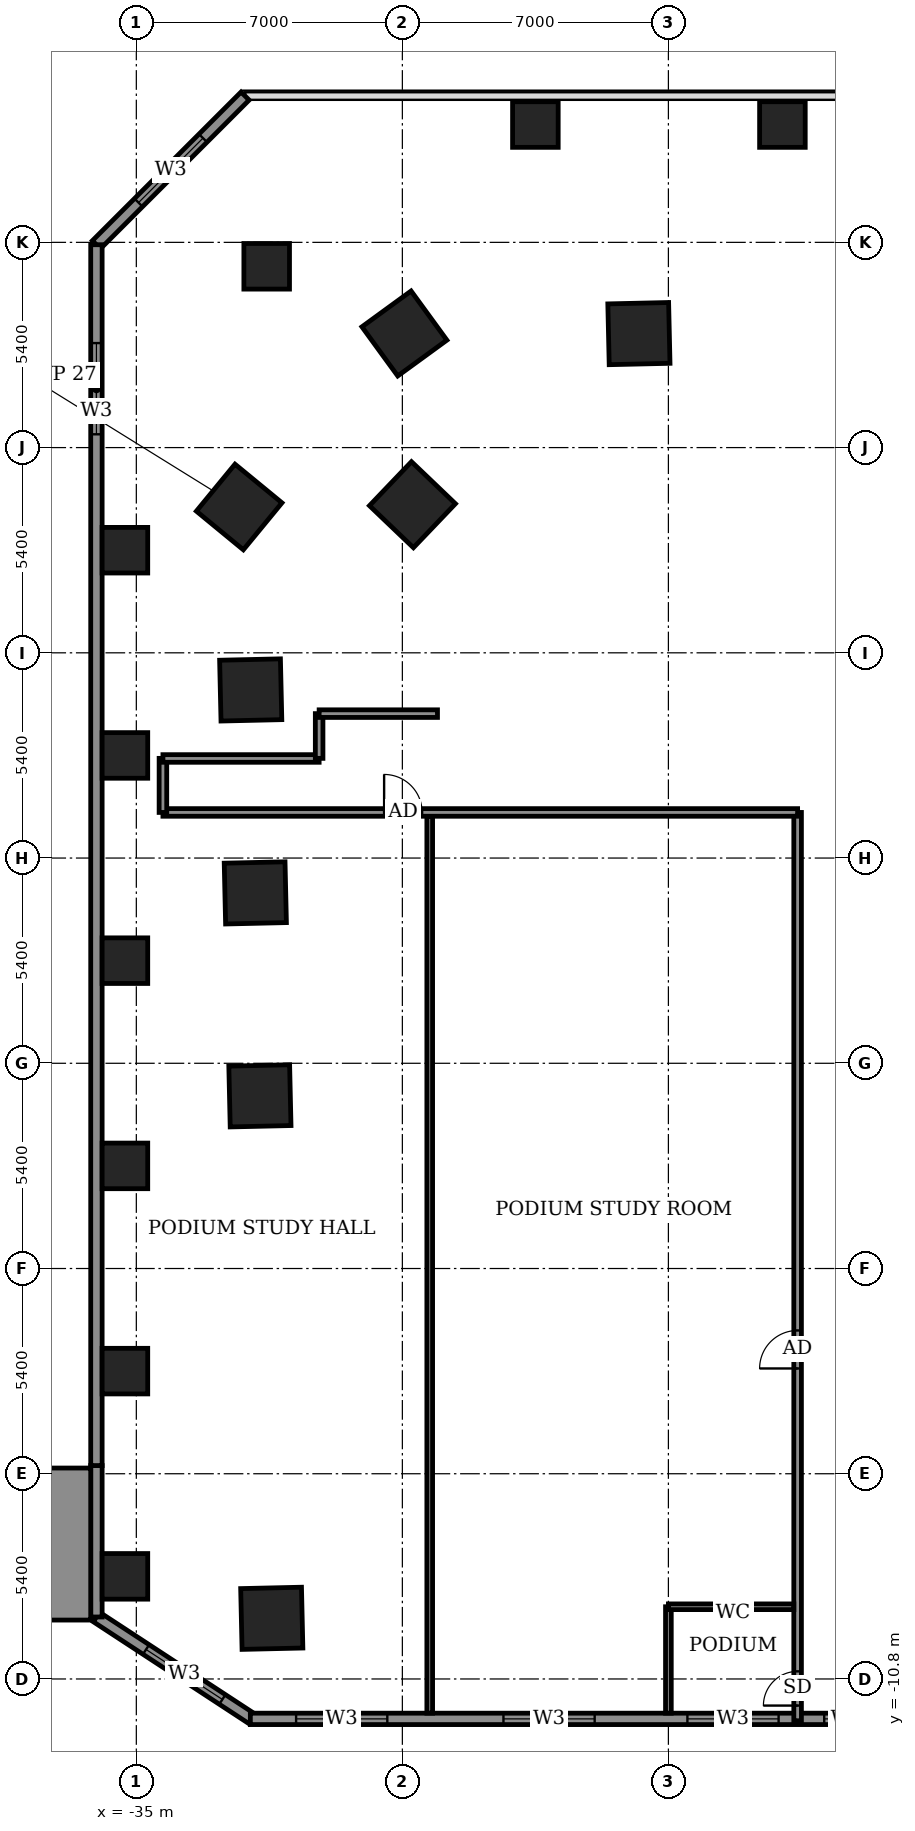
"""IFC4 building model, lengths in metres.
Left out: names, types, materials, properties, quantities, classifications, styles, units other than length and angle.
Written with IfcOpenShell. Run it as: python <this file> out.ifc"""

import sys

from ifc_helpers import new_model, si_unit, direction, frame, frame_2d, origin, origin_2d, place, context, subcontext, project, spatial, rectangle, extrude, element, fill, save


model = new_model("IFC4")
c1 = context("Model", 3, precision=1e-05, world=origin(), true_north=direction((0.0, 1.0)))
c2 = subcontext(c1, "Body", "Model", "MODEL_VIEW")
j1 = project(units=[si_unit("LENGTHUNIT", "METRE"), si_unit("PLANEANGLEUNIT", "RADIAN")], contexts=[c1])
p1 = place(None, origin())
s1 = spatial("IfcSite", under=j1, at=p1, CompositionType="ELEMENT")
p2 = place(p1, origin())
s2 = spatial("IfcBuilding", under=s1, at=p2, CompositionType="ELEMENT")
p3 = place(p2, frame((0.0, 0.0, 11.0)))
s3 = spatial("IfcBuildingStorey", under=s2, at=p3, CompositionType="ELEMENT", Elevation=11.0)
for number, where, z_axis, x_axis in (
    (1, (-31.436, -9.204, -0.55), (0.0, 0.0, 1.0), (0.023, -1.0, 0.0)),
    (2, (-21.776, 24.599, -0.55), (0.0, 0.0, 1.0), (-1.0, -0.023, 0.0)),
    (3, (-27.946, 24.602, -0.55), (0.0, 0.0, 1.0), (-0.808, -0.589, 0.0)),
    (4, (-27.735, 20.097, -0.55), (0.0, 0.0, 1.0), (-0.691, -0.723, 0.0)),
    (5, (-32.294, 20.037, -0.55), (0.0, 0.0, 1.0), (-0.635, -0.772, 0.0)),
    (6, (-31.99, 15.223, -0.55), (0.0, 0.0, 1.0), (0.023, -1.0, 0.0)),
    (7, (-31.869, 9.883, -0.55), (0.0, 0.0, 1.0), (0.023, -1.0, 0.0)),
    (8, (-31.748, 4.543, -0.55), (0.0, 0.0, 1.0), (0.023, -1.0, 0.0)),
):
    element("IfcColumn", number, at=place(p3, frame(where, z_axis=z_axis, x_axis=x_axis)), inside=s3, PredefinedType="COLUMN", context=c2, shape_type="SweptSolid", body=[
        extrude(rectangle(XDim=1.6, YDim=1.6, at=origin_2d()), origin(), (0.0, 0.0, 1.0), 5.0),
    ])
for number, where, z_axis, x_axis in (
    (9, (-24.5, 30.1, -0.55), (0.0, 0.0, 1.0), (1.0, 0.0, 0.0)),
    (10, (-18.0, 30.1, -0.55), (0.0, 0.0, 1.0), (1.0, 0.0, 0.0)),
    (11, (-35.3, -8.1, -0.55), (0.0, 0.0, 1.0), (1.0, 0.0, 0.0)),
    (12, (-35.3, -2.7, -0.55), (0.0, 0.0, 1.0), (1.0, 0.0, 0.0)),
    (13, (-35.3, 2.7, -0.55), (0.0, 0.0, 1.0), (1.0, 0.0, 0.0)),
    (14, (-35.3, 8.1, -0.55), (0.0, 0.0, 1.0), (1.0, 0.0, 0.0)),
    (15, (-35.3, 13.5, -0.55), (0.0, 0.0, 1.0), (1.0, 0.0, 0.0)),
    (16, (-35.3, 18.9, -0.55), (0.0, 0.0, 1.0), (1.0, 0.0, 0.0)),
    (17, (-31.57, 26.37, -0.55), (0.0, 0.0, 1.0), (1.0, 0.0, 0.0)),
):
    element("IfcColumn", number, at=place(p3, frame(where, z_axis=z_axis, x_axis=x_axis)), inside=s3, PredefinedType="COLUMN", context=c2, shape_type="SweptSolid", body=[
        extrude(rectangle(XDim=1.2, YDim=1.2, at=origin_2d()), origin(), (0.0, 0.0, 1.0), 5.0),
    ])
p4 = place(p3, frame((-36.05, -9.169, 0.0), z_axis=(0.0, 0.0, 1.0), x_axis=(0.836625876117, -0.54777471958, 0.0)))
e18 = element("IfcWall", 18, at=p4, inside=s3, PredefinedType="SOLIDWALL", context=c2, shape_type="SweptSolid", body=[
    extrude(rectangle(XDim=4.895, YDim=0.3, at=frame_2d((2.447, 0.0))), origin(), (0.0, 0.0, 1.0), 4.45),
])
p5 = place(p4, frame((1.561, 0.0, 0.9)))
e19 = element("IfcOpeningElement", 19, at=p5, cuts=e18, PredefinedType="OPENING", context=c2, shape_type="SweptSolid", body=[
    extrude(rectangle(XDim=2.4, YDim=1.8, at=frame_2d((1.2, 0.9))), frame((0.0, 0.16, 0.0), z_axis=(0.0, -1.0, 0.0), x_axis=(1.0, 0.0, 0.0)), (0.0, 0.0, 1.0), 0.32),
])
p6 = place(p3, frame((-32.0, -11.85, 0.0), z_axis=(0.0, 0.0, 1.0), x_axis=(1.0, 0.0, 0.0)))
e20 = element("IfcWall", 20, at=p6, inside=s3, PredefinedType="SOLIDWALL", context=c2, shape_type="SweptSolid", body=[
    extrude(rectangle(XDim=17.0, YDim=0.3, at=frame_2d((8.5, 0.0))), origin(), (0.0, 0.0, 1.0), 4.45),
])
p7 = place(p6, frame((1.204, 0.0, 0.9)))
e21 = element("IfcOpeningElement", 21, at=p7, cuts=e20, PredefinedType="OPENING", context=c2, shape_type="SweptSolid", body=[
    extrude(rectangle(XDim=2.4, YDim=1.8, at=frame_2d((1.2, 0.9))), frame((0.0, 0.16, 0.0), z_axis=(0.0, -1.0, 0.0), x_axis=(1.0, 0.0, 0.0)), (0.0, 0.0, 1.0), 0.32),
])
p8 = place(p6, frame((6.66, 0.0, 0.9)))
e22 = element("IfcOpeningElement", 22, at=p8, cuts=e20, PredefinedType="OPENING", context=c2, shape_type="SweptSolid", body=[
    extrude(rectangle(XDim=2.4, YDim=1.8, at=frame_2d((1.2, 0.9))), frame((0.0, 0.16, 0.0), z_axis=(0.0, -1.0, 0.0), x_axis=(1.0, 0.0, 0.0)), (0.0, 0.0, 1.0), 0.32),
])
p9 = place(p6, frame((11.5, 0.0, 0.9)))
e23 = element("IfcOpeningElement", 23, at=p9, cuts=e20, PredefinedType="OPENING", context=c2, shape_type="SweptSolid", body=[
    extrude(rectangle(XDim=2.4, YDim=1.8, at=frame_2d((1.2, 0.9))), frame((0.0, 0.16, 0.0), z_axis=(0.0, -1.0, 0.0), x_axis=(1.0, 0.0, 0.0)), (0.0, 0.0, 1.0), 0.32),
])
p10 = place(p6, frame((15.1, 0.0, 0.9)))
e24 = element("IfcOpeningElement", 24, at=p10, cuts=e20, PredefinedType="OPENING", context=c2, shape_type="SweptSolid", body=[
    extrude(rectangle(XDim=1.2, YDim=1.5, at=frame_2d((0.6, 0.75))), frame((0.0, 0.16, 0.0), z_axis=(0.0, -1.0, 0.0), x_axis=(1.0, 0.0, 0.0)), (0.0, 0.0, 1.0), 0.32),
])
p11 = place(p3, frame((-32.138, 30.85, 0.0), z_axis=(0.0, 0.0, 1.0), x_axis=(-0.707106781187, -0.707106781187, 0.0)))
e25 = element("IfcWall", 25, at=p11, inside=s3, PredefinedType="SOLIDWALL", context=c2, shape_type="SweptSolid", body=[
    extrude(rectangle(XDim=5.532, YDim=0.3, at=frame_2d((2.766, 0.0))), origin(), (0.0, 0.0, 1.0), 4.45),
])
p12 = place(p11, frame((1.566, 0.0, 0.9)))
e26 = element("IfcOpeningElement", 26, at=p12, cuts=e25, PredefinedType="OPENING", context=c2, shape_type="SweptSolid", body=[
    extrude(rectangle(XDim=2.4, YDim=1.8, at=frame_2d((1.2, 0.9))), frame((0.0, 0.16, 0.0), z_axis=(0.0, -1.0, 0.0), x_axis=(1.0, 0.0, 0.0)), (0.0, 0.0, 1.0), 0.32),
])
p13 = place(p3, frame((-36.05, -5.185, 0.0), z_axis=(0.0, 0.0, 1.0), x_axis=(0.0, -1.0, 0.0)))
e27 = element("IfcWall", 27, at=p13, inside=s3, PredefinedType="SOLIDWALL", context=c2, shape_type="SweptSolid", body=[
    extrude(rectangle(XDim=3.984, YDim=0.3, at=frame_2d((1.992, 0.0))), origin(), (0.0, 0.0, 1.0), 4.45),
])
p14 = place(p3, frame((-36.05, 26.938, 0.0), z_axis=(0.0, 0.0, 1.0), x_axis=(0.0, -1.0, 0.0)))
e28 = element("IfcWall", 28, at=p14, inside=s3, PredefinedType="SOLIDWALL", context=c2, shape_type="SweptSolid", body=[
    extrude(rectangle(XDim=32.123, YDim=0.3, at=frame_2d((16.062, 0.0))), origin(), (0.0, 0.0, 1.0), 4.45),
])
p15 = place(p14, frame((2.588, 0.0, 0.9)))
e29 = element("IfcOpeningElement", 29, at=p15, cuts=e28, PredefinedType="OPENING", context=c2, shape_type="SweptSolid", body=[
    extrude(rectangle(XDim=2.4, YDim=1.8, at=frame_2d((1.2, 0.9))), frame((0.0, 0.16, 0.0), z_axis=(0.0, -1.0, 0.0), x_axis=(1.0, 0.0, 0.0)), (0.0, 0.0, 1.0), 0.32),
])
p16 = place(p3, frame((-37.45, -9.25, 0.0), z_axis=(0.0, 0.0, 1.0), x_axis=(0.0, 1.0, 0.0)))
e30 = element("IfcWall", 30, at=p16, inside=s3, PredefinedType="STANDARD", context=c2, shape_type="SweptSolid", body=[
    extrude(rectangle(XDim=4.0, YDim=2.5, at=frame_2d((2.0, 0.0))), origin(), (0.0, 0.0, 1.0), 5.0),
])
p17 = place(p3, frame((-27.28, -11.7, 0.0), z_axis=(0.0, 0.0, 1.0), x_axis=(0.0, 1.0, 0.0)))
e31 = element("IfcWall", 31, at=p17, inside=s3, PredefinedType="PARTITIONING", context=c2, shape_type="SweptSolid", body=[
    extrude(rectangle(XDim=23.6, YDim=0.15, at=frame_2d((11.8, 0.0))), origin(), (0.0, 0.0, 1.0), 4.45),
])
p18 = place(p3, frame((-21.0, -11.7, 0.0), z_axis=(0.0, 0.0, 1.0), x_axis=(0.0, 1.0, 0.0)))
e32 = element("IfcWall", 32, at=p18, inside=s3, PredefinedType="PARTITIONING", context=c2, shape_type="SweptSolid", body=[
    extrude(rectangle(XDim=2.8, YDim=0.15, at=frame_2d((1.4, 0.0))), origin(), (0.0, 0.0, 1.0), 4.45),
])
p19 = place(p3, frame((-17.6, -11.9, 0.0), z_axis=(0.0, 0.0, 1.0), x_axis=(0.0, 1.0, 0.0)))
e33 = element("IfcWall", 33, at=p19, inside=s3, PredefinedType="PARTITIONING", context=c2, shape_type="SweptSolid", body=[
    extrude(rectangle(XDim=23.9, YDim=0.2, at=frame_2d((11.95, 0.0))), origin(), (0.0, 0.0, 1.0), 4.45),
])
p20 = place(p19, frame((9.27, 0.0, 0.0)))
e34 = element("IfcOpeningElement", 34, at=p20, cuts=e33, PredefinedType="OPENING", context=c2, shape_type="SweptSolid", body=[
    extrude(rectangle(XDim=1.0, YDim=2.1, at=frame_2d((0.5, 1.05))), frame((0.0, 0.11, 0.0), z_axis=(0.0, -1.0, 0.0), x_axis=(1.0, 0.0, 0.0)), (0.0, 0.0, 1.0), 0.22),
])
p21 = place(p19, frame((0.4, 0.0, 0.0)))
e35 = element("IfcOpeningElement", 35, at=p21, cuts=e33, PredefinedType="OPENING", context=c2, shape_type="SweptSolid", body=[
    extrude(rectangle(XDim=0.9, YDim=2.1, at=frame_2d((0.45, 1.05))), frame((0.0, 0.11, 0.0), z_axis=(0.0, -1.0, 0.0), x_axis=(1.0, 0.0, 0.0)), (0.0, 0.0, 1.0), 0.22),
])
p22 = place(p3, frame((-21.0, -8.9, 0.0), z_axis=(0.0, 0.0, 1.0), x_axis=(1.0, 0.0, 0.0)))
e36 = element("IfcWall", 36, at=p22, inside=s3, PredefinedType="PARTITIONING", context=c2, shape_type="SweptSolid", body=[
    extrude(rectangle(XDim=3.3, YDim=0.15, at=frame_2d((1.65, 0.0))), origin(), (0.0, 0.0, 1.0), 4.45),
])
p23 = place(p3, frame((-34.3, 12.0, 0.0), z_axis=(0.0, 0.0, 1.0), x_axis=(1.0, 0.0, 0.0)))
e37 = element("IfcWall", 37, at=p23, inside=s3, PredefinedType="PARTITIONING", context=c2, shape_type="SweptSolid", body=[
    extrude(rectangle(XDim=16.7, YDim=0.2, at=frame_2d((8.35, 0.0))), origin(), (0.0, 0.0, 1.0), 4.45),
])
p24 = place(p23, frame((5.82, 0.0, 0.0)))
e38 = element("IfcOpeningElement", 38, at=p24, cuts=e37, PredefinedType="OPENING", context=c2, shape_type="SweptSolid", body=[
    extrude(rectangle(XDim=1.0, YDim=2.1, at=frame_2d((0.5, 1.05))), frame((0.0, 0.11, 0.0), z_axis=(0.0, -1.0, 0.0), x_axis=(1.0, 0.0, 0.0)), (0.0, 0.0, 1.0), 0.22),
])
p25 = place(p3, frame((-34.3, 12.0, 0.0), z_axis=(0.0, 0.0, 1.0), x_axis=(0.0, 1.0, 0.0)))
e39 = element("IfcWall", 39, at=p25, inside=s3, PredefinedType="PARTITIONING", context=c2, shape_type="SweptSolid", body=[
    extrude(rectangle(XDim=1.423, YDim=0.2, at=frame_2d((0.711, 0.0))), origin(), (0.0, 0.0, 1.0), 4.45),
])
p26 = place(p3, frame((-34.3, 13.42, 0.0), z_axis=(0.0, 0.0, 1.0), x_axis=(1.0, 0.0, 0.0)))
e40 = element("IfcWall", 40, at=p26, inside=s3, PredefinedType="PARTITIONING", context=c2, shape_type="SweptSolid", body=[
    extrude(rectangle(XDim=4.11, YDim=0.2, at=frame_2d((2.055, 0.0))), origin(), (0.0, 0.0, 1.0), 4.45),
])
p27 = place(p3, frame((-30.19, 13.423, 0.0), z_axis=(0.0, 0.0, 1.0), x_axis=(0.0, 1.0, 0.0)))
e41 = element("IfcWall", 41, at=p27, inside=s3, PredefinedType="PARTITIONING", context=c2, shape_type="SweptSolid", body=[
    extrude(rectangle(XDim=1.177, YDim=0.2, at=frame_2d((0.588, 0.0))), origin(), (0.0, 0.0, 1.0), 4.45),
])
p28 = place(p3, frame((-30.19, 14.6, 0.0), z_axis=(0.0, 0.0, 1.0), x_axis=(1.0, 0.0, 0.0)))
e42 = element("IfcWall", 42, at=p28, inside=s3, PredefinedType="PARTITIONING", context=c2, shape_type="SweptSolid", body=[
    extrude(rectangle(XDim=3.114, YDim=0.2, at=frame_2d((1.557, 0.0))), origin(), (0.0, 0.0, 1.0), 4.45),
])
p29 = place(p5, origin())
e43 = element("IfcWindow", 43, at=p29, inside=s3, PartitioningType="DOUBLE_PANEL_VERTICAL", PredefinedType="WINDOW", context=c2, shape_type="SweptSolid", body=[
    extrude(rectangle(XDim=2.4, YDim=1.8, at=frame_2d((1.2, 0.9))), frame((0.0, 0.03, 0.0), z_axis=(0.0, -1.0, 0.0), x_axis=(1.0, 0.0, 0.0)), (0.0, 0.0, 1.0), 0.06),
])
fill(e19, e43)
p30 = place(p7, origin())
e44 = element("IfcWindow", 44, at=p30, inside=s3, PartitioningType="DOUBLE_PANEL_VERTICAL", PredefinedType="WINDOW", context=c2, shape_type="SweptSolid", body=[
    extrude(rectangle(XDim=2.4, YDim=1.8, at=frame_2d((1.2, 0.9))), frame((0.0, 0.03, 0.0), z_axis=(0.0, -1.0, 0.0), x_axis=(1.0, 0.0, 0.0)), (0.0, 0.0, 1.0), 0.06),
])
fill(e21, e44)
p31 = place(p8, origin())
e45 = element("IfcWindow", 45, at=p31, inside=s3, PartitioningType="DOUBLE_PANEL_VERTICAL", PredefinedType="WINDOW", context=c2, shape_type="SweptSolid", body=[
    extrude(rectangle(XDim=2.4, YDim=1.8, at=frame_2d((1.2, 0.9))), frame((0.0, 0.03, 0.0), z_axis=(0.0, -1.0, 0.0), x_axis=(1.0, 0.0, 0.0)), (0.0, 0.0, 1.0), 0.06),
])
fill(e22, e45)
p32 = place(p9, origin())
e46 = element("IfcWindow", 46, at=p32, inside=s3, PartitioningType="DOUBLE_PANEL_VERTICAL", PredefinedType="WINDOW", context=c2, shape_type="SweptSolid", body=[
    extrude(rectangle(XDim=2.4, YDim=1.8, at=frame_2d((1.2, 0.9))), frame((0.0, 0.03, 0.0), z_axis=(0.0, -1.0, 0.0), x_axis=(1.0, 0.0, 0.0)), (0.0, 0.0, 1.0), 0.06),
])
fill(e23, e46)
p33 = place(p10, origin())
e47 = element("IfcWindow", 47, at=p33, inside=s3, PartitioningType="SINGLE_PANEL", PredefinedType="WINDOW", context=c2, shape_type="SweptSolid", body=[
    extrude(rectangle(XDim=1.2, YDim=1.5, at=frame_2d((0.6, 0.75))), frame((0.0, 0.03, 0.0), z_axis=(0.0, -1.0, 0.0), x_axis=(1.0, 0.0, 0.0)), (0.0, 0.0, 1.0), 0.06),
])
fill(e24, e47)
p34 = place(p12, origin())
e48 = element("IfcWindow", 48, at=p34, inside=s3, PartitioningType="DOUBLE_PANEL_VERTICAL", PredefinedType="WINDOW", context=c2, shape_type="SweptSolid", body=[
    extrude(rectangle(XDim=2.4, YDim=1.8, at=frame_2d((1.2, 0.9))), frame((0.0, 0.03, 0.0), z_axis=(0.0, -1.0, 0.0), x_axis=(1.0, 0.0, 0.0)), (0.0, 0.0, 1.0), 0.06),
])
fill(e26, e48)
p35 = place(p15, origin())
e49 = element("IfcWindow", 49, at=p35, inside=s3, PartitioningType="DOUBLE_PANEL_VERTICAL", PredefinedType="WINDOW", context=c2, shape_type="SweptSolid", body=[
    extrude(rectangle(XDim=2.4, YDim=1.8, at=frame_2d((1.2, 0.9))), frame((0.0, 0.03, 0.0), z_axis=(0.0, -1.0, 0.0), x_axis=(1.0, 0.0, 0.0)), (0.0, 0.0, 1.0), 0.06),
])
fill(e29, e49)
p36 = place(p20, origin())
e50 = element("IfcDoor", 50, at=p36, inside=s3, OperationType="SINGLE_SWING_LEFT", PredefinedType="DOOR", context=c2, shape_type="SweptSolid", body=[
    extrude(rectangle(XDim=1.0, YDim=2.1, at=frame_2d((0.5, 1.05))), frame((0.0, 0.025, 0.0), z_axis=(0.0, -1.0, 0.0), x_axis=(1.0, 0.0, 0.0)), (0.0, 0.0, 1.0), 0.05),
])
fill(e34, e50)
p37 = place(p21, origin())
e51 = element("IfcDoor", 51, at=p37, inside=s3, OperationType="SINGLE_SWING_LEFT", PredefinedType="DOOR", context=c2, shape_type="SweptSolid", body=[
    extrude(rectangle(XDim=0.9, YDim=2.1, at=frame_2d((0.45, 1.05))), frame((0.0, 0.025, 0.0), z_axis=(0.0, -1.0, 0.0), x_axis=(1.0, 0.0, 0.0)), (0.0, 0.0, 1.0), 0.05),
])
fill(e35, e51)
p38 = place(p24, origin())
e52 = element("IfcDoor", 52, at=p38, inside=s3, OperationType="SINGLE_SWING_RIGHT", PredefinedType="DOOR", context=c2, shape_type="SweptSolid", body=[
    extrude(rectangle(XDim=1.0, YDim=2.1, at=frame_2d((0.5, 1.05))), frame((0.0, 0.025, 0.0), z_axis=(0.0, -1.0, 0.0), x_axis=(1.0, 0.0, 0.0)), (0.0, 0.0, 1.0), 0.05),
])
fill(e38, e52)
save(model, sys.argv[1])
